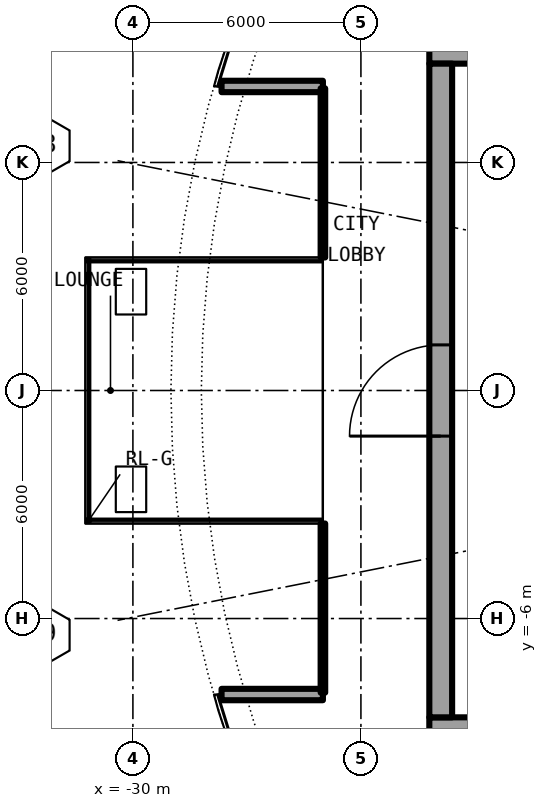
"""IFC4 building model, lengths in metres.
Left out: names, types, materials, properties, quantities, classifications, styles, units other than length and angle.
Written with IfcOpenShell. Run it as: python <this file> out.ifc"""

import sys

from ifc_helpers import new_model, si_unit, direction, frame, frame_2d, origin, place, context, subcontext, project, spatial, rectangle, extrude, element, fill, save


model = new_model("IFC4")
c1 = context("Model", 3, precision=1e-05, world=origin(), true_north=direction((0.0, 1.0)))
c2 = subcontext(c1, "Body", "Model", "MODEL_VIEW")
j1 = project(units=[si_unit("LENGTHUNIT", "METRE"), si_unit("PLANEANGLEUNIT", "RADIAN")], contexts=[c1])
p1 = place(None, origin())
s1 = spatial("IfcSite", under=j1, at=p1, CompositionType="ELEMENT")
p2 = place(p1, origin())
s2 = spatial("IfcBuilding", under=s1, at=p2, CompositionType="ELEMENT")
p3 = place(p2, frame((0.0, 0.0, 139.1)))
s3 = spatial("IfcBuildingStorey", under=s2, at=p3, CompositionType="ELEMENT", Elevation=139.1)
for number, where, z_axis, x_axis in (
    (1, (-25.0, 8.0, 0.0), (0.0, 0.0, 1.0), (-1.0, 0.0, 0.0)),
    (2, (-25.0, -8.0, 0.0), (0.0, 0.0, 1.0), (-1.0, 0.0, 0.0)),
):
    element("IfcWall", number, at=place(p3, frame(where, z_axis=z_axis, x_axis=x_axis)), inside=s3, PredefinedType="SOLIDWALL", context=c2, shape_type="SweptSolid", body=[
        extrude(rectangle(XDim=2.667, YDim=0.3, at=frame_2d((1.333, 0.0))), origin(), (0.0, 0.0, 1.0), 5.75),
    ])
p4 = place(p3, frame((-22.2, -8.9, 0.0), z_axis=(0.0, 0.0, 1.0), x_axis=(1.0, 0.0, 0.0)))
e3 = element("IfcWall", 3, at=p4, inside=s3, PredefinedType="SHEAR", context=c2, shape_type="SweptSolid", body=[
    extrude(rectangle(XDim=13.8, YDim=0.6, at=frame_2d((6.9, 0.0))), origin(), (0.0, 0.0, 1.0), 6.1),
])
p5 = place(p4, frame((1.125, 0.0, 0.0)))
e4 = element("IfcOpeningElement", 4, at=p5, cuts=e3, PredefinedType="OPENING", context=c2, shape_type="SweptSolid", body=[
    extrude(rectangle(XDim=1.2, YDim=2.3, at=frame_2d((0.6, 1.15))), frame((0.0, 0.31, 0.0), z_axis=(0.0, -1.0, 0.0), x_axis=(1.0, 0.0, 0.0)), (0.0, 0.0, 1.0), 0.62),
])
p6 = place(p3, frame((-8.4, 8.9, 0.0), z_axis=(0.0, 0.0, 1.0), x_axis=(-1.0, 0.0, 0.0)))
e5 = element("IfcWall", 5, at=p6, inside=s3, PredefinedType="SHEAR", context=c2, shape_type="SweptSolid", body=[
    extrude(rectangle(XDim=13.8, YDim=0.6, at=frame_2d((6.9, 0.0))), origin(), (0.0, 0.0, 1.0), 6.1),
])
p7 = place(p6, frame((11.475, 0.0, 0.0)))
e6 = element("IfcOpeningElement", 6, at=p7, cuts=e5, PredefinedType="OPENING", context=c2, shape_type="SweptSolid", body=[
    extrude(rectangle(XDim=1.2, YDim=2.3, at=frame_2d((0.6, 1.15))), frame((0.0, 0.31, 0.0), z_axis=(0.0, -1.0, 0.0), x_axis=(1.0, 0.0, 0.0)), (0.0, 0.0, 1.0), 0.62),
])
p8 = place(p3, frame((-21.9, -8.6, 0.0), z_axis=(0.0, 0.0, 1.0), x_axis=(0.0, 1.0, 0.0)))
e7 = element("IfcWall", 7, at=p8, inside=s3, PredefinedType="SHEAR", context=c2, shape_type="SweptSolid", body=[
    extrude(rectangle(XDim=17.2, YDim=0.6, at=frame_2d((8.6, 0.0))), origin(), (0.0, 0.0, 1.0), 6.1),
])
p9 = place(p8, frame((7.4, 0.0, 0.0)))
e8 = element("IfcOpeningElement", 8, at=p9, cuts=e7, PredefinedType="OPENING", context=c2, shape_type="SweptSolid", body=[
    extrude(rectangle(XDim=2.4, YDim=2.3, at=frame_2d((1.2, 1.15))), frame((0.0, 0.31, 0.0), z_axis=(0.0, -1.0, 0.0), x_axis=(1.0, 0.0, 0.0)), (0.0, 0.0, 1.0), 0.62),
])
p10 = place(p3, frame((-25.0, 3.5, 0.0), z_axis=(0.0, 0.0, 1.0), x_axis=(0.0, 1.0, 0.0)))
e9 = element("IfcWall", 9, at=p10, inside=s3, PredefinedType="PARTITIONING", context=c2, shape_type="SweptSolid", body=[
    extrude(rectangle(XDim=4.45, YDim=0.12, at=frame_2d((2.225, 0.0))), origin(), (0.0, 0.0, 1.0), 5.75),
])
p11 = place(p10, frame((0.4, 0.0, 0.1)))
e10 = element("IfcOpeningElement", 10, at=p11, cuts=e9, PredefinedType="OPENING", context=c2, shape_type="SweptSolid", body=[
    extrude(rectangle(XDim=3.6, YDim=5.4, at=frame_2d((1.8, 2.7))), frame((0.0, 0.07, 0.0), z_axis=(0.0, -1.0, 0.0), x_axis=(1.0, 0.0, 0.0)), (0.0, 0.0, 1.0), 0.14),
])
p12 = place(p3, frame((-25.0, -3.5, 0.0), z_axis=(0.0, 0.0, 1.0), x_axis=(0.0, -1.0, 0.0)))
e11 = element("IfcWall", 11, at=p12, inside=s3, PredefinedType="PARTITIONING", context=c2, shape_type="SweptSolid", body=[
    extrude(rectangle(XDim=4.45, YDim=0.12, at=frame_2d((2.225, 0.0))), origin(), (0.0, 0.0, 1.0), 5.75),
])
p13 = place(p12, frame((0.4, 0.0, 0.1)))
e12 = element("IfcOpeningElement", 12, at=p13, cuts=e11, PredefinedType="OPENING", context=c2, shape_type="SweptSolid", body=[
    extrude(rectangle(XDim=3.6, YDim=5.4, at=frame_2d((1.8, 2.7))), frame((0.0, 0.07, 0.0), z_axis=(0.0, -1.0, 0.0), x_axis=(1.0, 0.0, 0.0)), (0.0, 0.0, 1.0), 0.14),
])
p14 = place(p9, origin())
e13 = element("IfcDoor", 13, at=p14, inside=s3, OperationType="SINGLE_SWING_LEFT", PredefinedType="DOOR", context=c2, shape_type="SweptSolid", body=[
    extrude(rectangle(XDim=2.4, YDim=2.3, at=frame_2d((1.2, 1.15))), frame((0.0, 0.025, 0.0), z_axis=(0.0, -1.0, 0.0), x_axis=(1.0, 0.0, 0.0)), (0.0, 0.0, 1.0), 0.05),
])
fill(e8, e13)
p15 = place(p11, origin())
e14 = element("IfcWindow", 14, at=p15, inside=s3, PartitioningType="SINGLE_PANEL", PredefinedType="WINDOW", context=c2, shape_type="SweptSolid", body=[
    extrude(rectangle(XDim=3.6, YDim=5.4, at=frame_2d((1.8, 2.7))), frame((0.0, 0.03, 0.0), z_axis=(0.0, -1.0, 0.0), x_axis=(1.0, 0.0, 0.0)), (0.0, 0.0, 1.0), 0.06),
])
fill(e10, e14)
p16 = place(p13, origin())
e15 = element("IfcWindow", 15, at=p16, inside=s3, PartitioningType="SINGLE_PANEL", PredefinedType="WINDOW", context=c2, shape_type="SweptSolid", body=[
    extrude(rectangle(XDim=3.6, YDim=5.4, at=frame_2d((1.8, 2.7))), frame((0.0, 0.03, 0.0), z_axis=(0.0, -1.0, 0.0), x_axis=(1.0, 0.0, 0.0)), (0.0, 0.0, 1.0), 0.06),
])
fill(e12, e15)
save(model, sys.argv[1])
